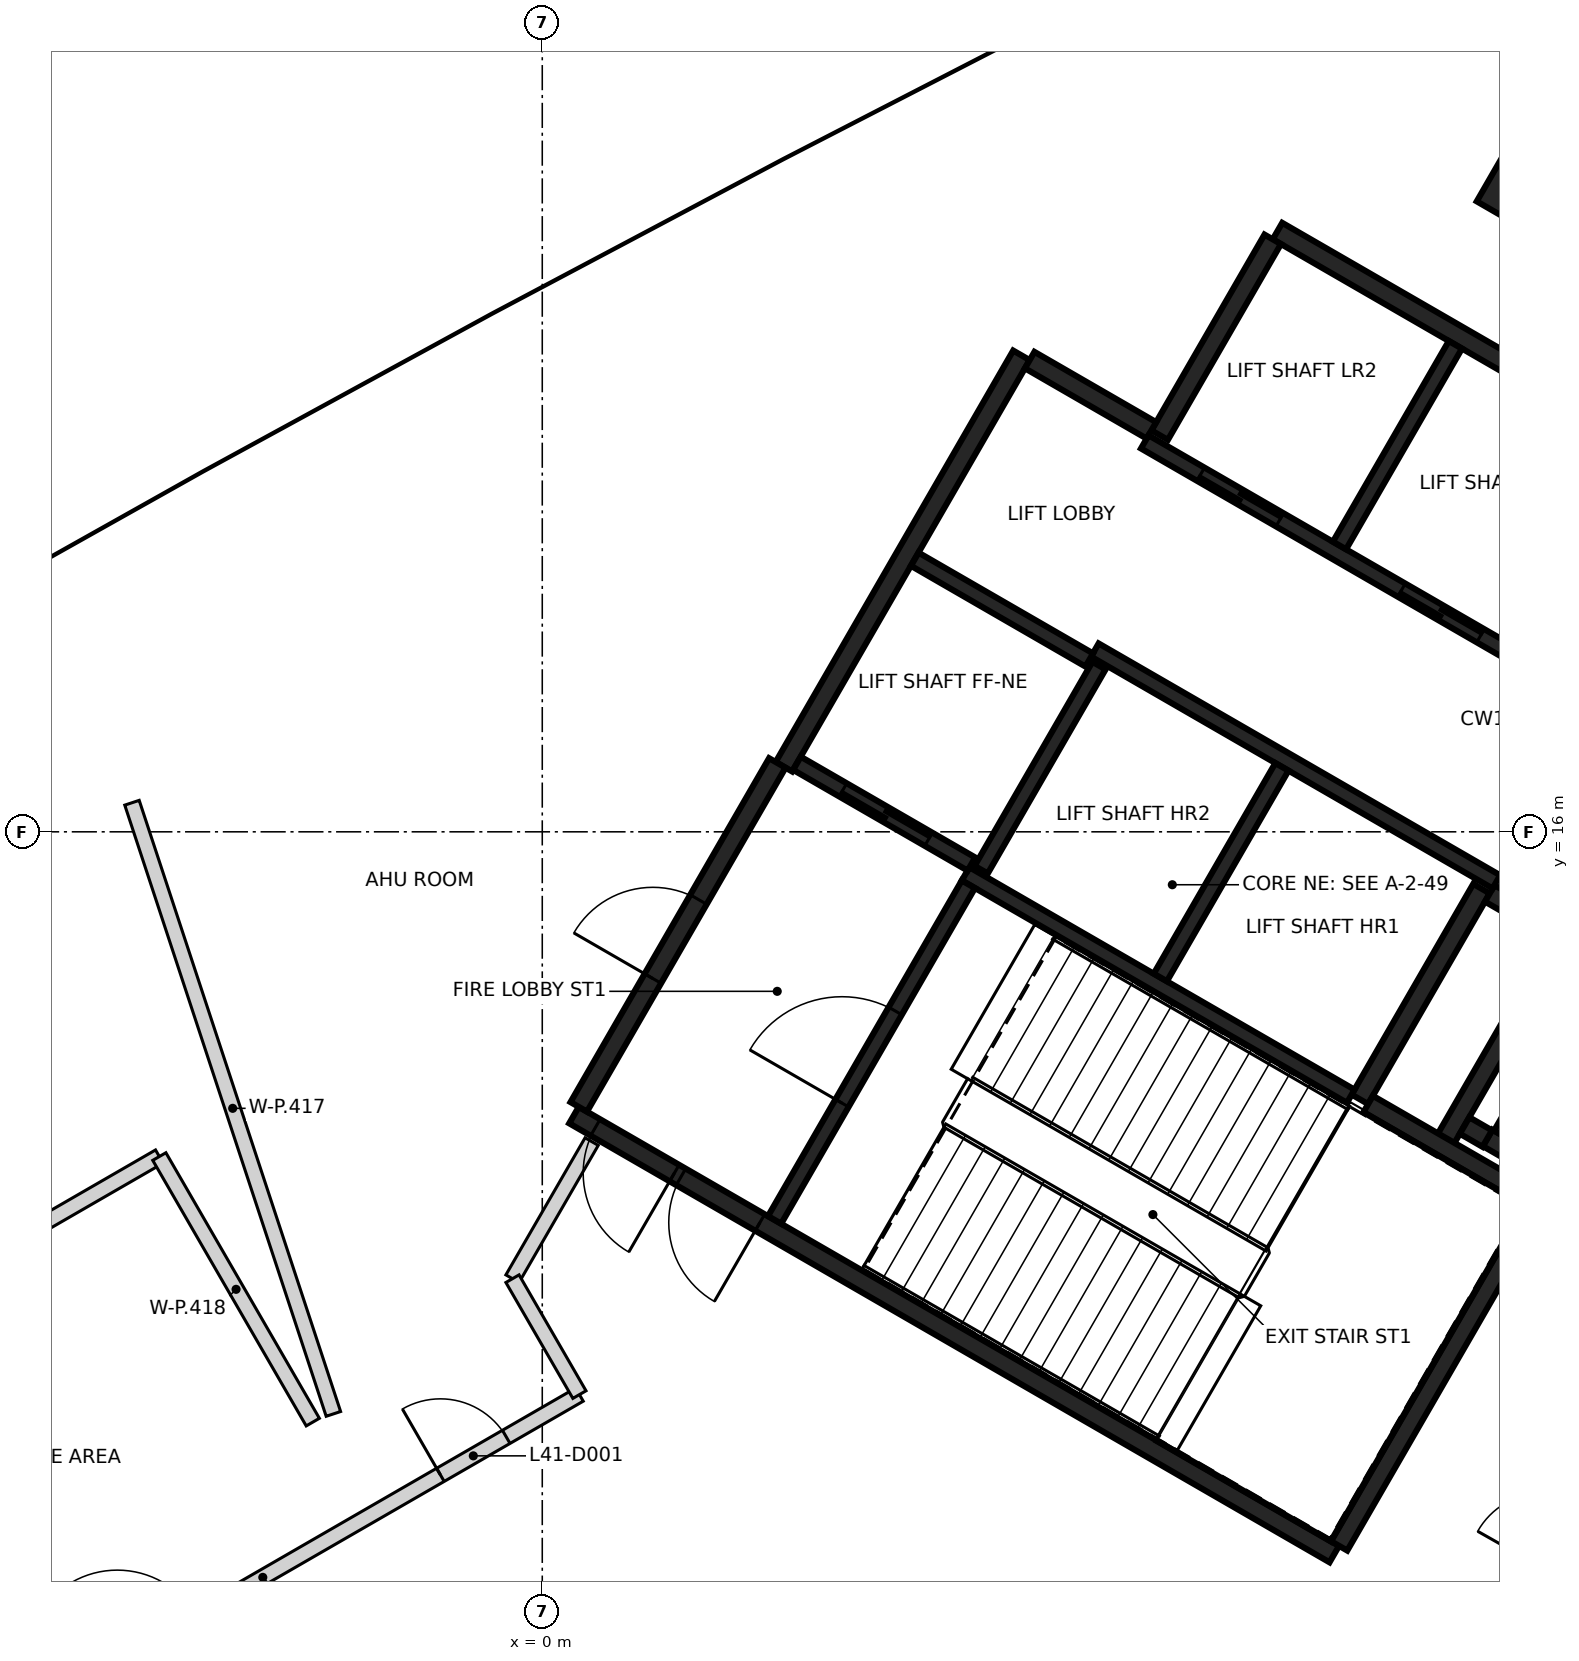
"""IFC4 building model, lengths in metres.
Left out: names, types, materials, properties, quantities, classifications, styles, units other than length and angle.
Written with IfcOpenShell. Run it as: python <this file> out.ifc"""

import sys

from ifc_helpers import new_model, si_unit, direction, frame, frame_2d, origin, origin_2d, place, context, subcontext, project, spatial, rectangle, extrude, element, fill, save


model = new_model("IFC4")
c1 = context("Model", 3, precision=1e-05, world=origin(), true_north=direction((0.0, 1.0)))
c2 = subcontext(c1, "Body", "Model", "MODEL_VIEW")
j1 = project(units=[si_unit("LENGTHUNIT", "METRE"), si_unit("PLANEANGLEUNIT", "RADIAN")], contexts=[c1])
p1 = place(None, origin())
s1 = spatial("IfcSite", under=j1, at=p1, CompositionType="ELEMENT")
p2 = place(p1, origin())
s2 = spatial("IfcBuilding", under=s1, at=p2, CompositionType="ELEMENT")
p3 = place(p2, frame((0.0, 0.0, 164.8)))
s3 = spatial("IfcBuildingStorey", under=s2, at=p3, CompositionType="ELEMENT", Elevation=164.8)
p4 = place(p3, frame((14.493, 25.103, -0.4), z_axis=(0.0, 0.0, 1.0), x_axis=(0.5, 0.866025403784, 0.0)))
e1 = element("IfcColumn", 1, at=p4, inside=s3, PredefinedType="COLUMN", context=c2, shape_type="SweptSolid", body=[
    extrude(rectangle(XDim=3.6, YDim=3.0, at=origin_2d()), origin(), (0.0, 0.0, 1.0), 4.85),
])
p5 = place(p3, frame((10.42, 6.498, 0.0), z_axis=(0.0, 0.0, 1.0), x_axis=(-0.866021906294, 0.500006057782, 0.0)))
e2 = element("IfcWall", 2, at=p5, inside=s3, PredefinedType="SHEAR", context=c2, shape_type="SweptSolid", body=[
    extrude(rectangle(XDim=11.55, YDim=0.25, at=frame_2d((5.775, 0.0))), origin(), (0.0, 0.0, 1.0), 4.45),
])
p6 = place(p5, frame((10.025, 0.0, 0.0)))
e3 = element("IfcOpeningElement", 3, at=p6, cuts=e2, PredefinedType="OPENING", context=c2, shape_type="SweptSolid", body=[
    extrude(rectangle(XDim=1.2, YDim=2.1, at=frame_2d((0.6, 1.05))), frame((0.0, 0.135, 0.0), z_axis=(0.0, -1.0, 0.0), x_axis=(1.0, 0.0, 0.0)), (0.0, 0.0, 1.0), 0.27),
])
p7 = place(p5, frame((8.725, 0.0, 0.0)))
e4 = element("IfcOpeningElement", 4, at=p7, cuts=e2, PredefinedType="OPENING", context=c2, shape_type="SweptSolid", body=[
    extrude(rectangle(XDim=1.2, YDim=2.1, at=frame_2d((0.6, 1.05))), frame((0.0, 0.135, 0.0), z_axis=(0.0, -1.0, 0.0), x_axis=(1.0, 0.0, 0.0)), (0.0, 0.0, 1.0), 0.27),
])
p8 = place(p3, frame((3.179, 16.856, 0.0), z_axis=(0.0, 0.0, 1.0), x_axis=(0.500004234368, 0.866022959057, 0.0)))
e5 = element("IfcWall", 5, at=p8, inside=s3, PredefinedType="SHEAR", context=c2, shape_type="SweptSolid", body=[
    extrude(rectangle(XDim=6.25, YDim=0.25, at=frame_2d((3.125, 0.0))), origin(), (0.0, 0.0, 1.0), 4.45),
])
p9 = place(p3, frame((9.673, 23.903, 0.0), z_axis=(0.0, 0.0, 1.0), x_axis=(0.86603616409, -0.499981362141, 0.0)))
e6 = element("IfcWall", 6, at=p9, inside=s3, PredefinedType="SHEAR", context=c2, shape_type="SweptSolid", body=[
    extrude(rectangle(XDim=5.85, YDim=0.25, at=frame_2d((2.925, 0.0))), origin(), (0.0, 0.0, 1.0), 4.45),
])
p10 = place(p3, frame((0.48, 12.381, 0.0), z_axis=(0.0, 0.0, 1.0), x_axis=(0.49999885962, 0.866026062182, 0.0)))
e7 = element("IfcWall", 7, at=p10, inside=s3, PredefinedType="SHEAR", context=c2, shape_type="SweptSolid", body=[
    extrude(rectangle(XDim=5.225, YDim=0.25, at=frame_2d((2.612, 0.0))), origin(), (0.0, 0.0, 1.0), 4.45),
])
p11 = place(p10, frame((1.95, 0.0, 0.0)))
e8 = element("IfcOpeningElement", 8, at=p11, cuts=e7, PredefinedType="OPENING", context=c2, shape_type="SweptSolid", body=[
    extrude(rectangle(XDim=1.2, YDim=2.1, at=frame_2d((0.6, 1.05))), frame((0.0, 0.135, 0.0), z_axis=(0.0, -1.0, 0.0), x_axis=(1.0, 0.0, 0.0)), (0.0, 0.0, 1.0), 0.27),
])
p12 = place(p3, frame((13.238, 11.378, 0.0), z_axis=(0.0, 0.0, 1.0), x_axis=(-0.500008851346, -0.866020293397, 0.0)))
e9 = element("IfcWall", 9, at=p12, inside=s3, PredefinedType="SHEAR", context=c2, shape_type="SweptSolid", body=[
    extrude(rectangle(XDim=5.51, YDim=0.25, at=frame_2d((2.755, 0.0))), origin(), (0.0, 0.0, 1.0), 4.45),
])
p13 = place(p3, frame((12.357, 15.252, 0.0), z_axis=(0.0, 0.0, 1.0), x_axis=(-0.500028443584, -0.866008981251, 0.0)))
e10 = element("IfcWall", 10, at=p13, inside=s3, PredefinedType="SHEAR", context=c2, shape_type="SweptSolid", body=[
    extrude(rectangle(XDim=3.2, YDim=0.25, at=frame_2d((1.6, 0.0))), origin(), (0.0, 0.0, 1.0), 4.45),
])
p14 = place(p3, frame((8.123, 21.219, 0.0), z_axis=(0.0, 0.0, 1.0), x_axis=(0.499987686533, 0.866032512851, 0.0)))
e11 = element("IfcWall", 11, at=p14, inside=s3, PredefinedType="SHEAR", context=c2, shape_type="SweptSolid", body=[
    extrude(rectangle(XDim=2.975, YDim=0.25, at=frame_2d((1.487, 0.0))), origin(), (0.0, 0.0, 1.0), 4.45),
])
p15 = place(p3, frame((14.918, 10.54, 0.0), z_axis=(0.0, 0.0, 1.0), x_axis=(-0.866063538972, 0.499933942099, 0.0)))
e12 = element("IfcWall", 12, at=p15, inside=s3, PredefinedType="SHEAR", context=c2, shape_type="SweptSolid", body=[
    extrude(rectangle(XDim=2.865, YDim=0.25, at=frame_2d((1.432, 0.0))), origin(), (0.0, 0.0, 1.0), 4.45),
])
p16 = place(p3, frame((11.888, 11.961, 0.0), z_axis=(0.0, 0.0, 1.0), x_axis=(0.500003324108, 0.866023484601, 0.0)))
e13 = element("IfcWall", 13, at=p16, inside=s3, PredefinedType="SHEAR", context=c2, shape_type="SweptSolid", body=[
    extrude(rectangle(XDim=3.085, YDim=0.25, at=frame_2d((1.542, 0.0))), origin(), (0.0, 0.0, 1.0), 4.45),
])
p17 = place(p3, frame((10.865, 12.418, 0.0), z_axis=(0.0, 0.0, 1.0), x_axis=(0.866026229868, -0.499998569178, 0.0)))
e14 = element("IfcWall", 14, at=p17, inside=s3, PredefinedType="SHEAR", context=c2, shape_type="SweptSolid", body=[
    extrude(rectangle(XDim=2.449, YDim=0.25, at=frame_2d((1.225, 0.0))), origin(), (0.0, 0.0, 1.0), 4.45),
])
p18 = place(p3, frame((6.413, 22.206, 0.0), z_axis=(0.0, 0.0, 1.0), x_axis=(0.866016279763, -0.500015802937, 0.0)))
e15 = element("IfcWall", 15, at=p18, inside=s3, PredefinedType="SHEAR", context=c2, shape_type="SweptSolid", body=[
    extrude(rectangle(XDim=1.849, YDim=0.25, at=frame_2d((0.925, 0.0))), origin(), (0.0, 0.0, 1.0), 4.45),
])
p19 = place(p3, frame((13.322, 14.695, 0.0), z_axis=(0.0, 0.0, 1.0), x_axis=(-0.866017078145, 0.500014420154, 0.0)))
e16 = element("IfcWall", 16, at=p19, inside=s3, PredefinedType="SHEAR", context=c2, shape_type="SweptSolid", body=[
    extrude(rectangle(XDim=0.989, YDim=0.25, at=frame_2d((0.495, 0.0))), origin(), (0.0, 0.0, 1.0), 4.45),
])
p20 = place(p3, frame((12.433, 11.964, 0.0), z_axis=(0.0, 0.0, 1.0), x_axis=(-0.866055875208, 0.499947218231, 0.0)))
e17 = element("IfcWall", 17, at=p20, inside=s3, PredefinedType="SHEAR", context=c2, shape_type="SweptSolid", body=[
    extrude(rectangle(XDim=0.345, YDim=0.25, at=frame_2d((0.172, 0.0))), origin(), (0.0, 0.0, 1.0), 4.45),
])
p21 = place(p3, frame((13.21, 18.08, 0.0), z_axis=(0.0, 0.0, 1.0), x_axis=(-0.866030299012, 0.499991521122, 0.0)))
e18 = element("IfcWall", 18, at=p21, inside=s3, PredefinedType="SHEAR", context=c2, shape_type="SweptSolid", body=[
    extrude(rectangle(XDim=6.1, YDim=0.2, at=frame_2d((3.05, 0.0))), origin(), (0.0, 0.0, 1.0), 4.45),
])
p22 = place(p21, frame((1.0, 0.0, 0.0)))
e19 = element("IfcOpeningElement", 19, at=p22, cuts=e18, PredefinedType="OPENING", context=c2, shape_type="SweptSolid", body=[
    extrude(rectangle(XDim=1.2, YDim=2.1, at=frame_2d((0.6, 1.05))), frame((0.0, 0.11, 0.0), z_axis=(0.0, -1.0, 0.0), x_axis=(1.0, 0.0, 0.0)), (0.0, 0.0, 1.0), 0.22),
])
p23 = place(p21, frame((4.05, 0.0, 0.0)))
e20 = element("IfcOpeningElement", 20, at=p23, cuts=e18, PredefinedType="OPENING", context=c2, shape_type="SweptSolid", body=[
    extrude(rectangle(XDim=1.2, YDim=2.1, at=frame_2d((0.6, 1.05))), frame((0.0, 0.11, 0.0), z_axis=(0.0, -1.0, 0.0), x_axis=(1.0, 0.0, 0.0)), (0.0, 0.0, 1.0), 0.22),
])
p24 = place(p3, frame((12.552, 15.342, 0.0), z_axis=(0.0, 0.0, 1.0), x_axis=(-0.866030299012, 0.499991521122, 0.0)))
e21 = element("IfcWall", 21, at=p24, inside=s3, PredefinedType="SHEAR", context=c2, shape_type="SweptSolid", body=[
    extrude(rectangle(XDim=6.1, YDim=0.2, at=frame_2d((3.05, 0.0))), origin(), (0.0, 0.0, 1.0), 4.45),
])
p25 = place(p3, frame((10.636, 12.521, 0.0), z_axis=(0.0, 0.0, 1.0), x_axis=(-0.866013252188, 0.500021046592, 0.0)))
e22 = element("IfcWall", 22, at=p25, inside=s3, PredefinedType="SHEAR", context=c2, shape_type="SweptSolid", body=[
    extrude(rectangle(XDim=5.851, YDim=0.2, at=frame_2d((2.925, 0.0))), origin(), (0.0, 0.0, 1.0), 4.45),
])
p26 = place(p3, frame((3.057, 10.895, 0.0), z_axis=(0.0, 0.0, 1.0), x_axis=(0.500027839223, 0.866009330205, 0.0)))
e23 = element("IfcWall", 23, at=p26, inside=s3, PredefinedType="SHEAR", context=c2, shape_type="SweptSolid", body=[
    extrude(rectangle(XDim=5.098, YDim=0.2, at=frame_2d((2.549, 0.0))), origin(), (0.0, 0.0, 1.0), 4.45),
])
p27 = place(p26, frame((1.774, 0.0, 0.0)))
e24 = element("IfcOpeningElement", 24, at=p27, cuts=e23, PredefinedType="OPENING", context=c2, shape_type="SweptSolid", body=[
    extrude(rectangle(XDim=1.4, YDim=2.1, at=frame_2d((0.7, 1.05))), frame((0.0, 0.11, 0.0), z_axis=(0.0, -1.0, 0.0), x_axis=(1.0, 0.0, 0.0)), (0.0, 0.0, 1.0), 0.22),
])
p28 = place(p3, frame((8.132, 14.084, 0.0), z_axis=(0.0, 0.0, 1.0), x_axis=(0.500030834389, 0.86600760081, 0.0)))
e25 = element("IfcWall", 25, at=p28, inside=s3, PredefinedType="SHEAR", context=c2, shape_type="SweptSolid", body=[
    extrude(rectangle(XDim=3.198, YDim=0.2, at=frame_2d((1.599, 0.0))), origin(), (0.0, 0.0, 1.0), 4.45),
])
p29 = place(p3, frame((10.489, 19.767, 0.0), z_axis=(0.0, 0.0, 1.0), x_axis=(0.499946628782, 0.866056215479, 0.0)))
e26 = element("IfcWall", 26, at=p29, inside=s3, PredefinedType="SHEAR", context=c2, shape_type="SweptSolid", body=[
    extrude(rectangle(XDim=3.048, YDim=0.2, at=frame_2d((1.524, 0.0))), origin(), (0.0, 0.0, 1.0), 4.45),
])
p30 = place(p3, frame((14.008, 14.442, 0.0), z_axis=(0.0, 0.0, 1.0), x_axis=(-0.499986818241, -0.866033014143, 0.0)))
e27 = element("IfcWall", 27, at=p30, inside=s3, PredefinedType="SHEAR", context=c2, shape_type="SweptSolid", body=[
    extrude(rectangle(XDim=2.798, YDim=0.2, at=frame_2d((1.399, 0.0))), origin(), (0.0, 0.0, 1.0), 4.45),
])
p31 = place(p30, frame((0.949, 0.0, 0.0)))
e28 = element("IfcOpeningElement", 28, at=p31, cuts=e27, PredefinedType="OPENING", context=c2, shape_type="SweptSolid", body=[
    extrude(rectangle(XDim=0.9, YDim=2.1, at=frame_2d((0.45, 1.05))), frame((0.0, 0.11, 0.0), z_axis=(0.0, -1.0, 0.0), x_axis=(1.0, 0.0, 0.0)), (0.0, 0.0, 1.0), 0.22),
])
p32 = place(p3, frame((7.324, 18.187, 0.0), z_axis=(0.0, 0.0, 1.0), x_axis=(-0.499967891604, -0.866043940782, 0.0)))
e29 = element("IfcWall", 29, at=p32, inside=s3, PredefinedType="SHEAR", context=c2, shape_type="SweptSolid", body=[
    extrude(rectangle(XDim=3.1, YDim=0.2, at=frame_2d((1.55, 0.0))), origin(), (0.0, 0.0, 1.0), 4.45),
])
p33 = place(p3, frame((5.646, 15.576, 0.0), z_axis=(0.0, 0.0, 1.0), x_axis=(-0.866018407898, 0.500012117035, 0.0)))
e30 = element("IfcWall", 30, at=p33, inside=s3, PredefinedType="SHEAR", context=c2, shape_type="SweptSolid", body=[
    extrude(rectangle(XDim=2.651, YDim=0.2, at=frame_2d((1.325, 0.0))), origin(), (0.0, 0.0, 1.0), 4.45),
])
p34 = place(p33, frame((0.652, 0.0, 0.0)))
e31 = element("IfcOpeningElement", 31, at=p34, cuts=e30, PredefinedType="OPENING", context=c2, shape_type="SweptSolid", body=[
    extrude(rectangle(XDim=1.3, YDim=2.1, at=frame_2d((0.65, 1.05))), frame((0.0, 0.11, 0.0), z_axis=(0.0, -1.0, 0.0), x_axis=(1.0, 0.0, 0.0)), (0.0, 0.0, 1.0), 0.22),
])
p35 = place(p3, frame((7.196, 18.26, 0.0), z_axis=(0.0, 0.0, 1.0), x_axis=(-0.866018407898, 0.500012117035, 0.0)))
e32 = element("IfcWall", 32, at=p35, inside=s3, PredefinedType="SHEAR", context=c2, shape_type="SweptSolid", body=[
    extrude(rectangle(XDim=2.651, YDim=0.2, at=frame_2d((1.325, 0.0))), origin(), (0.0, 0.0, 1.0), 4.45),
])
p36 = place(p3, frame((-7.843, 3.787, 0.0), z_axis=(0.0, 0.0, 1.0), x_axis=(0.866104875001, 0.499862326546, 0.0)))
e33 = element("IfcWall", 33, at=p36, inside=s3, PredefinedType="PARTITIONING", context=c2, shape_type="SweptSolid", body=[
    extrude(rectangle(XDim=9.62, YDim=0.2, at=frame_2d((4.81, 0.0))), origin(), (0.0, 0.0, 1.0), 4.45),
])
p37 = place(p36, frame((7.508, 0.0, 0.0)))
e34 = element("IfcOpeningElement", 34, at=p37, cuts=e33, PredefinedType="OPENING", context=c2, shape_type="SweptSolid", body=[
    extrude(rectangle(XDim=1.0, YDim=2.1, at=frame_2d((0.5, 1.05))), frame((0.0, 0.11, 0.0), z_axis=(0.0, -1.0, 0.0), x_axis=(1.0, 0.0, 0.0)), (0.0, 0.0, 1.0), 0.22),
])
p38 = place(p36, frame((2.6, 0.0, 0.0)))
e35 = element("IfcOpeningElement", 35, at=p38, cuts=e33, PredefinedType="OPENING", context=c2, shape_type="SweptSolid", body=[
    extrude(rectangle(XDim=1.2, YDim=2.1, at=frame_2d((0.6, 1.05))), frame((0.0, 0.11, 0.0), z_axis=(0.0, -1.0, 0.0), x_axis=(1.0, 0.0, 0.0)), (0.0, 0.0, 1.0), 0.22),
])
p39 = place(p3, frame((-0.392, 10.121, 0.0), z_axis=(0.0, 0.0, 1.0), x_axis=(0.50017216111, 0.865925983702, 0.0)))
e36 = element("IfcWall", 36, at=p39, inside=s3, PredefinedType="PARTITIONING", context=c2, shape_type="SweptSolid", body=[
    extrude(rectangle(XDim=2.083, YDim=0.2, at=frame_2d((1.042, 0.0))), origin(), (0.0, 0.0, 1.0), 4.45),
])
p40 = place(p3, frame((-0.392, 10.121, 0.0), z_axis=(0.0, 0.0, 1.0), x_axis=(0.500238339471, -0.86588775469, 0.0)))
e37 = element("IfcWall", 37, at=p40, inside=s3, PredefinedType="PARTITIONING", context=c2, shape_type="SweptSolid", body=[
    extrude(rectangle(XDim=1.761, YDim=0.2, at=frame_2d((0.881, 0.0))), origin(), (0.0, 0.0, 1.0), 4.45),
])
p41 = place(p3, frame((12.403, 4.939, 0.0), z_axis=(0.0, 0.0, 1.0), x_axis=(0.492759848643, 0.870165347256, 0.0)))
e38 = element("IfcWall", 38, at=p41, inside=s3, PredefinedType="PARTITIONING", context=c2, shape_type="SweptSolid", body=[
    extrude(rectangle(XDim=4.144, YDim=0.2, at=frame_2d((2.072, 0.0))), origin(), (0.0, 0.0, 1.0), 4.45),
])
p42 = place(p41, frame((1.57, 0.0, 0.0)))
e39 = element("IfcOpeningElement", 39, at=p42, cuts=e38, PredefinedType="OPENING", context=c2, shape_type="SweptSolid", body=[
    extrude(rectangle(XDim=1.0, YDim=2.1, at=frame_2d((0.5, 1.05))), frame((0.0, 0.11, 0.0), z_axis=(0.0, -1.0, 0.0), x_axis=(1.0, 0.0, 0.0)), (0.0, 0.0, 1.0), 0.22),
])
p43 = place(p3, frame((-10.579, 8.529, 0.0), z_axis=(0.0, 0.0, 1.0), x_axis=(0.866034354261, 0.499984496999, 0.0)))
e40 = element("IfcWall", 40, at=p43, inside=s3, PredefinedType="PARTITIONING", context=c2, shape_type="SweptSolid", body=[
    extrude(rectangle(XDim=6.398, YDim=0.2, at=frame_2d((3.199, 0.0))), origin(), (0.0, 0.0, 1.0), 4.45),
])
p44 = place(p3, frame((-5.398, 16.383, 0.0), z_axis=(0.0, 0.0, 1.0), x_axis=(0.312981612856, -0.949759185275, 0.0)))
e41 = element("IfcWall", 41, at=p44, inside=s3, PredefinedType="PARTITIONING", context=c2, shape_type="SweptSolid", body=[
    extrude(rectangle(XDim=8.466, YDim=0.2, at=frame_2d((4.233, 0.0))), origin(), (0.0, 0.0, 1.0), 4.45),
])
p45 = place(p3, frame((-5.038, 11.728, 0.0), z_axis=(0.0, 0.0, 1.0), x_axis=(0.500315898403, -0.86584294292, 0.0)))
e42 = element("IfcWall", 42, at=p45, inside=s3, PredefinedType="PARTITIONING", context=c2, shape_type="SweptSolid", body=[
    extrude(rectangle(XDim=4.036, YDim=0.2, at=frame_2d((2.018, 0.0))), origin(), (0.0, 0.0, 1.0), 4.45),
])
p46 = place(p34, origin())
e43 = element("IfcDoor", 43, at=p46, inside=s3, OperationType="SLIDING_TO_RIGHT", PredefinedType="DOOR", context=c2, shape_type="SweptSolid", body=[
    extrude(rectangle(XDim=1.3, YDim=2.1, at=frame_2d((0.65, 1.05))), frame((0.0, 0.025, 0.0), z_axis=(0.0, -1.0, 0.0), x_axis=(1.0, 0.0, 0.0)), (0.0, 0.0, 1.0), 0.05),
])
fill(e31, e43)
p47 = place(p22, origin())
e44 = element("IfcDoor", 44, at=p47, inside=s3, OperationType="DOUBLE_DOOR_SLIDING", PredefinedType="DOOR", context=c2, shape_type="SweptSolid", body=[
    extrude(rectangle(XDim=1.2, YDim=2.1, at=frame_2d((0.6, 1.05))), frame((0.0, 0.025, 0.0), z_axis=(0.0, -1.0, 0.0), x_axis=(1.0, 0.0, 0.0)), (0.0, 0.0, 1.0), 0.05),
])
fill(e19, e44)
p48 = place(p23, origin())
e45 = element("IfcDoor", 45, at=p48, inside=s3, OperationType="DOUBLE_DOOR_SLIDING", PredefinedType="DOOR", context=c2, shape_type="SweptSolid", body=[
    extrude(rectangle(XDim=1.2, YDim=2.1, at=frame_2d((0.6, 1.05))), frame((0.0, 0.025, 0.0), z_axis=(0.0, -1.0, 0.0), x_axis=(1.0, 0.0, 0.0)), (0.0, 0.0, 1.0), 0.05),
])
fill(e20, e45)
p49 = place(p6, origin())
e46 = element("IfcDoor", 46, at=p49, inside=s3, OperationType="SINGLE_SWING_LEFT", PredefinedType="DOOR", context=c2, shape_type="SweptSolid", body=[
    extrude(rectangle(XDim=1.2, YDim=2.1, at=frame_2d((0.6, 1.05))), frame((0.0, 0.025, 0.0), z_axis=(0.0, -1.0, 0.0), x_axis=(1.0, 0.0, 0.0)), (0.0, 0.0, 1.0), 0.05),
])
fill(e3, e46)
p50 = place(p7, origin())
e47 = element("IfcDoor", 47, at=p50, inside=s3, OperationType="SINGLE_SWING_RIGHT", PredefinedType="DOOR", context=c2, shape_type="SweptSolid", body=[
    extrude(rectangle(XDim=1.2, YDim=2.1, at=frame_2d((0.6, 1.05))), frame((0.0, 0.025, 0.0), z_axis=(0.0, -1.0, 0.0), x_axis=(1.0, 0.0, 0.0)), (0.0, 0.0, 1.0), 0.05),
])
fill(e4, e47)
p51 = place(p27, origin())
e48 = element("IfcDoor", 48, at=p51, inside=s3, OperationType="SINGLE_SWING_RIGHT", PredefinedType="DOOR", context=c2, shape_type="SweptSolid", body=[
    extrude(rectangle(XDim=1.4, YDim=2.1, at=frame_2d((0.7, 1.05))), frame((0.0, 0.025, 0.0), z_axis=(0.0, -1.0, 0.0), x_axis=(1.0, 0.0, 0.0)), (0.0, 0.0, 1.0), 0.05),
])
fill(e24, e48)
p52 = place(p11, origin())
e49 = element("IfcDoor", 49, at=p52, inside=s3, OperationType="SINGLE_SWING_LEFT", PredefinedType="DOOR", context=c2, shape_type="SweptSolid", body=[
    extrude(rectangle(XDim=1.2, YDim=2.1, at=frame_2d((0.6, 1.05))), frame((0.0, 0.025, 0.0), z_axis=(0.0, -1.0, 0.0), x_axis=(1.0, 0.0, 0.0)), (0.0, 0.0, 1.0), 0.05),
])
fill(e8, e49)
p53 = place(p37, origin())
e50 = element("IfcDoor", 50, at=p53, inside=s3, OperationType="SINGLE_SWING_LEFT", PredefinedType="DOOR", context=c2, shape_type="SweptSolid", body=[
    extrude(rectangle(XDim=1.0, YDim=2.1, at=frame_2d((0.5, 1.05))), frame((0.0, 0.025, 0.0), z_axis=(0.0, -1.0, 0.0), x_axis=(1.0, 0.0, 0.0)), (0.0, 0.0, 1.0), 0.05),
])
fill(e34, e50)
save(model, sys.argv[1])
